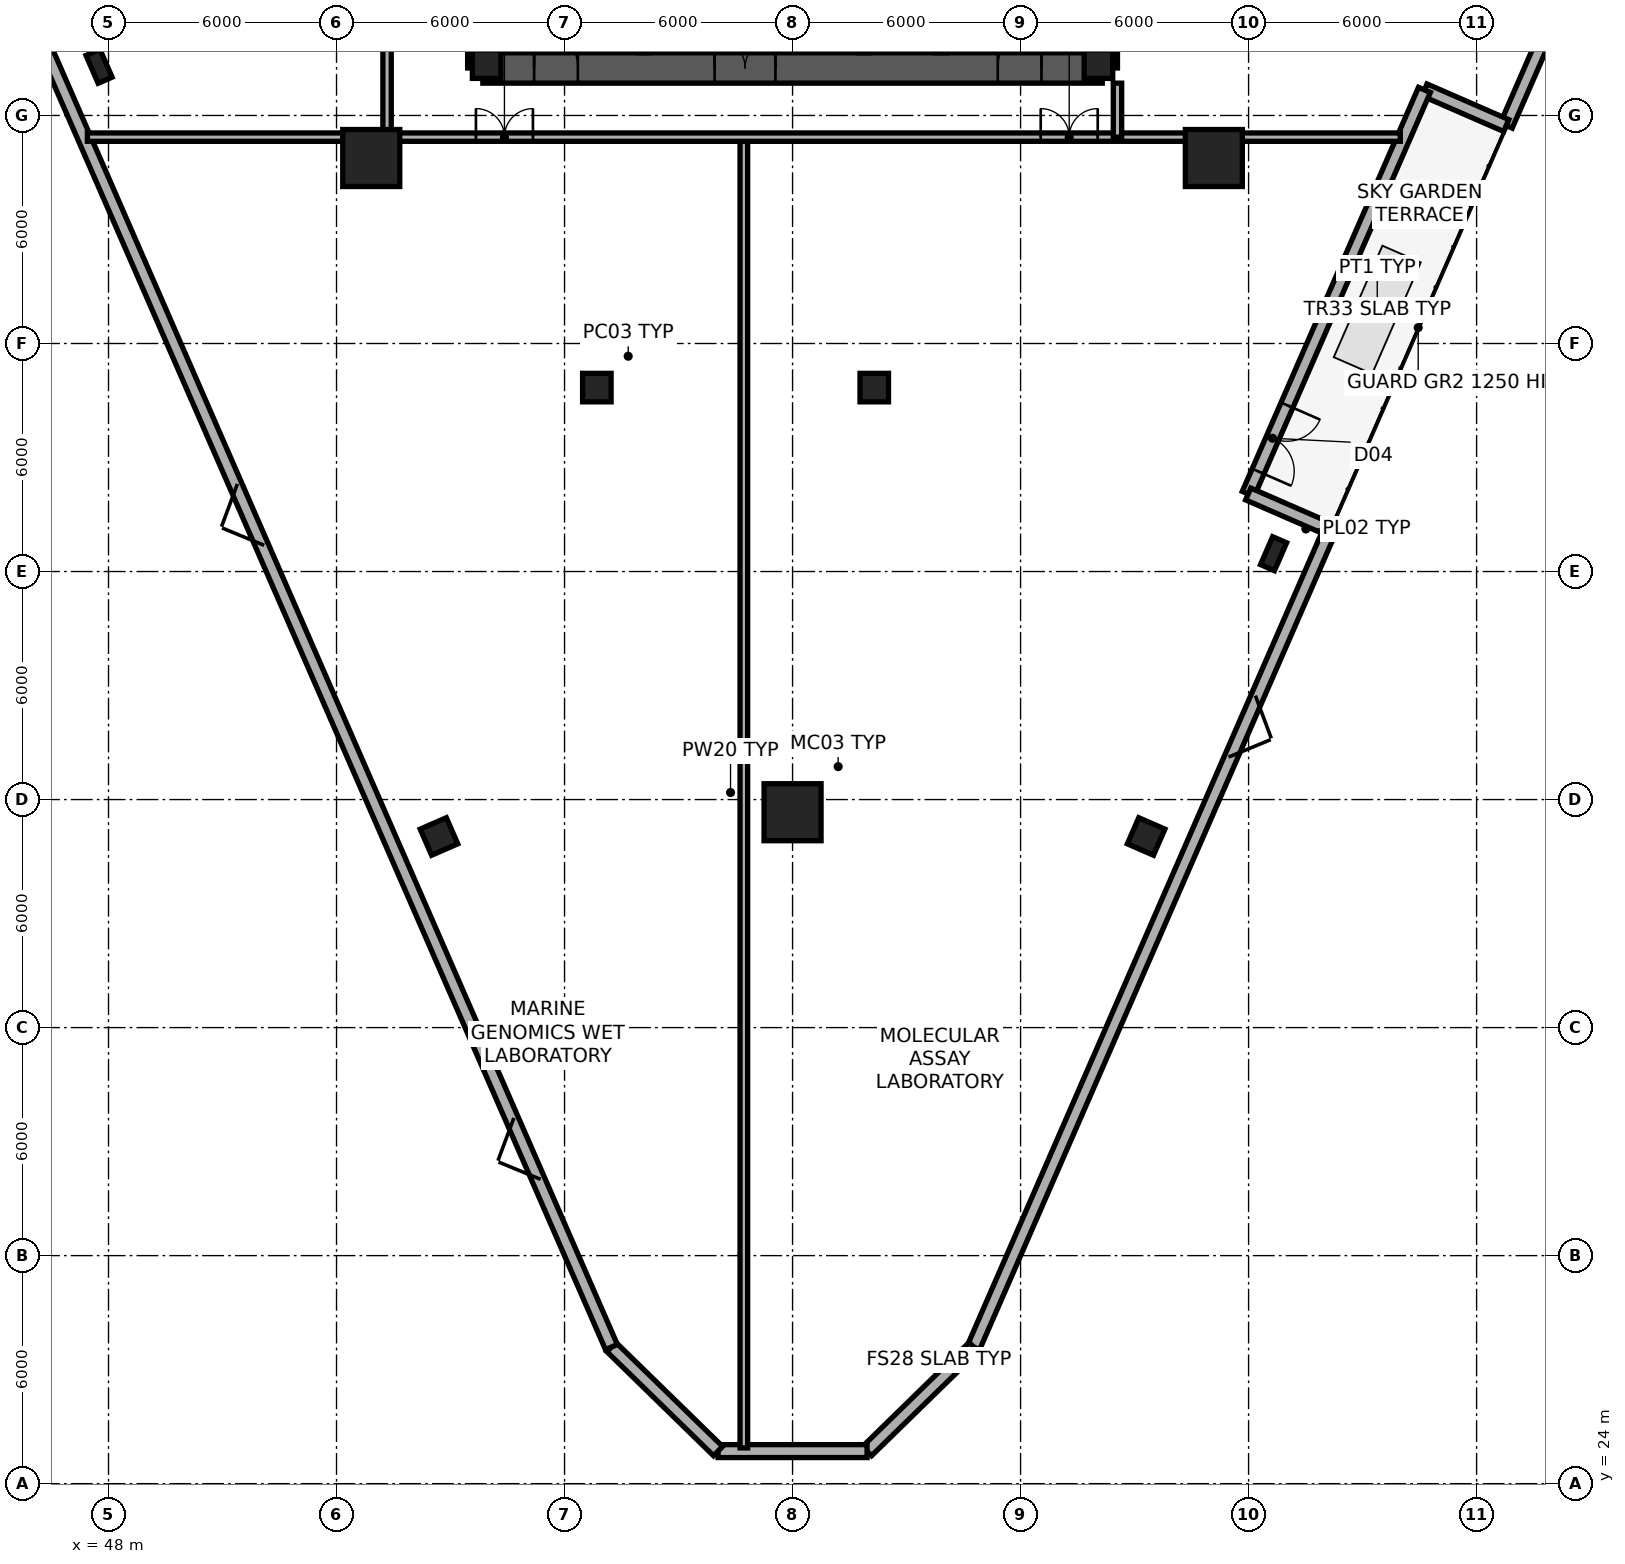
"""IFC4 building model, lengths in metres.
Left out: names, types, materials, properties, quantities, classifications, styles, units other than length and angle.
Written with IfcOpenShell. Run it as: python <this file> out.ifc"""

import sys

from ifc_helpers import new_model, si_unit, direction, frame, frame_2d, origin, origin_2d, place, context, subcontext, project, spatial, rectangle, extrude, element, fill, save


model = new_model("IFC4")
c1 = context("Model", 3, precision=1e-05, world=origin(), true_north=direction((0.0, 1.0)))
c2 = subcontext(c1, "Body", "Model", "MODEL_VIEW")
j1 = project(units=[si_unit("LENGTHUNIT", "METRE"), si_unit("PLANEANGLEUNIT", "RADIAN")], contexts=[c1])
p1 = place(None, origin())
s1 = spatial("IfcSite", under=j1, at=p1, CompositionType="ELEMENT")
p2 = place(p1, origin())
s2 = spatial("IfcBuilding", under=s1, at=p2, CompositionType="ELEMENT")
p3 = place(p2, frame((0.0, 0.0, 149.1)))
s3 = spatial("IfcBuildingStorey", under=s2, at=p3, CompositionType="ELEMENT", Elevation=149.1)
p4 = place(p3, frame((57.85, 61.25, 0.0), z_axis=(0.0, 0.0, 1.0), x_axis=(1.0, 0.0, 0.0)))
e1 = element("IfcWall", 1, at=p4, inside=s3, PredefinedType="SHEAR", context=c2, shape_type="SweptSolid", body=[
    extrude(rectangle(XDim=16.3, YDim=0.8, at=frame_2d((8.15, 0.0))), origin(), (0.0, 0.0, 1.0), 3.65),
])
p5 = place(p4, frame((1.35, 0.0, 0.0)))
e2 = element("IfcOpeningElement", 2, at=p5, cuts=e1, PredefinedType="OPENING", context=c2, shape_type="SweptSolid", body=[
    extrude(rectangle(XDim=1.15, YDim=2.15, at=frame_2d((0.575, 1.075))), frame((0.0, 0.41, 0.0), z_axis=(0.0, -1.0, 0.0), x_axis=(1.0, 0.0, 0.0)), (0.0, 0.0, 1.0), 0.82),
])
p6 = place(p4, frame((6.1, 0.0, 0.0)))
e3 = element("IfcOpeningElement", 3, at=p6, cuts=e1, PredefinedType="OPENING", context=c2, shape_type="SweptSolid", body=[
    extrude(rectangle(XDim=1.6, YDim=2.15, at=frame_2d((0.8, 1.075))), frame((0.0, 0.41, 0.0), z_axis=(0.0, -1.0, 0.0), x_axis=(1.0, 0.0, 0.0)), (0.0, 0.0, 1.0), 0.82),
])
p7 = place(p4, frame((13.55, 0.0, 0.0)))
e4 = element("IfcOpeningElement", 4, at=p7, cuts=e1, PredefinedType="OPENING", context=c2, shape_type="SweptSolid", body=[
    extrude(rectangle(XDim=1.15, YDim=2.15, at=frame_2d((0.575, 1.075))), frame((0.0, 0.41, 0.0), z_axis=(0.0, -1.0, 0.0), x_axis=(1.0, 0.0, 0.0)), (0.0, 0.0, 1.0), 0.82),
])
p8 = place(p3, frame((74.15, 61.25, 0.0), z_axis=(0.0, 0.0, 1.0), x_axis=(0.0, 1.0, 0.0)))
e5 = element("IfcWall", 5, at=p8, inside=s3, PredefinedType="SHEAR", context=c2, shape_type="SweptSolid", body=[
    extrude(rectangle(XDim=13.5, YDim=0.8, at=frame_2d((6.75, 0.0))), origin(), (0.0, 0.0, 1.0), 3.65),
])
p9 = place(p3, frame((57.85, 74.75, 0.0), z_axis=(0.0, 0.0, 1.0), x_axis=(0.0, -1.0, 0.0)))
e6 = element("IfcWall", 6, at=p9, inside=s3, PredefinedType="SHEAR", context=c2, shape_type="SweptSolid", body=[
    extrude(rectangle(XDim=13.5, YDim=0.8, at=frame_2d((6.75, 0.0))), origin(), (0.0, 0.0, 1.0), 3.65),
])
p10 = place(p9, frame((0.8, 0.0, 0.0)))
e7 = element("IfcOpeningElement", 7, at=p10, cuts=e6, PredefinedType="OPENING", context=c2, shape_type="SweptSolid", body=[
    extrude(rectangle(XDim=0.92, YDim=2.05, at=frame_2d((0.46, 1.025))), frame((0.0, 0.41, 0.0), z_axis=(0.0, -1.0, 0.0), x_axis=(1.0, 0.0, 0.0)), (0.0, 0.0, 1.0), 0.82),
])
p11 = place(p9, frame((2.5, 0.0, 0.0)))
e8 = element("IfcOpeningElement", 8, at=p11, cuts=e6, PredefinedType="OPENING", context=c2, shape_type="SweptSolid", body=[
    extrude(rectangle(XDim=1.6, YDim=2.3, at=frame_2d((0.8, 1.15))), frame((0.0, 0.41, 0.0), z_axis=(0.0, -1.0, 0.0), x_axis=(1.0, 0.0, 0.0)), (0.0, 0.0, 1.0), 0.82),
])
p12 = place(p3, frame((62.09, 61.65, 0.0), z_axis=(0.0, 0.0, 1.0), x_axis=(0.0, 1.0, 0.0)))
e9 = element("IfcWall", 9, at=p12, inside=s3, PredefinedType="SHEAR", context=c2, shape_type="SweptSolid", body=[
    extrude(rectangle(XDim=12.7, YDim=0.32, at=frame_2d((6.35, 0.0))), origin(), (0.0, 0.0, 1.0), 3.65),
])
p13 = place(p12, frame((0.55, 0.0, 0.0)))
e10 = element("IfcOpeningElement", 10, at=p13, cuts=e9, PredefinedType="OPENING", context=c2, shape_type="SweptSolid", body=[
    extrude(rectangle(XDim=1.15, YDim=2.15, at=frame_2d((0.575, 1.075))), frame((0.0, 0.17, 0.0), z_axis=(0.0, -1.0, 0.0), x_axis=(1.0, 0.0, 0.0)), (0.0, 0.0, 1.0), 0.34),
])
p14 = place(p3, frame((69.91, 61.65, 0.0), z_axis=(0.0, 0.0, 1.0), x_axis=(0.0, 1.0, 0.0)))
e11 = element("IfcWall", 11, at=p14, inside=s3, PredefinedType="SHEAR", context=c2, shape_type="SweptSolid", body=[
    extrude(rectangle(XDim=12.7, YDim=0.32, at=frame_2d((6.35, 0.0))), origin(), (0.0, 0.0, 1.0), 3.65),
])
p15 = place(p14, frame((8.75, 0.0, 0.0)))
e12 = element("IfcOpeningElement", 12, at=p15, cuts=e11, PredefinedType="OPENING", context=c2, shape_type="SweptSolid", body=[
    extrude(rectangle(XDim=0.92, YDim=2.05, at=frame_2d((0.46, 1.025))), frame((0.0, 0.17, 0.0), z_axis=(0.0, -1.0, 0.0), x_axis=(1.0, 0.0, 0.0)), (0.0, 0.0, 1.0), 0.34),
])
p16 = place(p3, frame((67.88, 61.65, 0.0), z_axis=(0.0, 0.0, 1.0), x_axis=(0.0, 1.0, 0.0)))
e13 = element("IfcWall", 13, at=p16, inside=s3, PredefinedType="SHEAR", context=c2, shape_type="SweptSolid", body=[
    extrude(rectangle(XDim=6.15, YDim=0.28, at=frame_2d((3.075, 0.0))), origin(), (0.0, 0.0, 1.0), 3.65),
])
p17 = place(p16, frame((1.1, 0.0, 0.0)))
e14 = element("IfcOpeningElement", 14, at=p17, cuts=e13, PredefinedType="OPENING", context=c2, shape_type="SweptSolid", body=[
    extrude(rectangle(XDim=0.92, YDim=2.05, at=frame_2d((0.46, 1.025))), frame((0.0, 0.15, 0.0), z_axis=(0.0, -1.0, 0.0), x_axis=(1.0, 0.0, 0.0)), (0.0, 0.0, 1.0), 0.3),
])
for number, where, z_axis, x_axis in (
    (15, (57.95, 61.35, 0.0), (0.0, 0.0, 1.0), (1.0, 0.0, 0.0)),
    (16, (74.05, 61.35, 0.0), (0.0, 0.0, 1.0), (1.0, 0.0, 0.0)),
    (17, (60.85, 52.84, 0.0), (0.0, 0.0, 1.0), (1.0, 0.0, 0.0)),
    (18, (68.15, 52.84, 0.0), (0.0, 0.0, 1.0), (1.0, 0.0, 0.0)),
):
    element("IfcColumn", number, at=place(p3, frame(where, z_axis=z_axis, x_axis=x_axis)), inside=s3, PredefinedType="COLUMN", context=c2, shape_type="SweptSolid", body=[
        extrude(rectangle(XDim=0.75, YDim=0.75, at=origin_2d()), origin(), (0.0, 0.0, 1.0), 3.65),
    ])
for number, where, z_axis, x_axis in (
    (19, (66.0, 41.667, 0.0), (0.0, 0.0, 1.0), (1.0, 0.0, 0.0)),
    (20, (77.086, 58.88, 0.0), (0.0, 0.0, 1.0), (1.0, 0.0, 0.0)),
    (21, (54.914, 58.88, 0.0), (0.0, 0.0, 1.0), (1.0, 0.0, 0.0)),
):
    element("IfcColumn", number, at=place(p3, frame(where, z_axis=z_axis, x_axis=x_axis)), inside=s3, PredefinedType="COLUMN", context=c2, shape_type="SweptSolid", body=[
        extrude(rectangle(XDim=1.5, YDim=1.5, at=origin_2d()), origin(), (0.0, 0.0, 1.0), 3.65),
    ])
p18 = place(p3, frame((75.327, 40.929, 0.003), z_axis=(-0.012375141264, 0.054450621561, 0.998439775695), x_axis=(-0.186922165753, -0.981040369671, 0.05118492967)))
e22 = element("IfcColumn", 22, at=p18, inside=s3, PredefinedType="COLUMN", context=c2, shape_type="SweptSolid", body=[
    extrude(rectangle(XDim=0.75, YDim=0.75, at=origin_2d()), origin(), (0.0, 0.0, 1.0), 3.65),
])
p19 = place(p3, frame((78.693, 48.4, 0.003), z_axis=(-0.019612004119, 0.038286915892, 0.999074312234), x_axis=(0.061780737122, -0.99731050874, 0.03943208944)))
e23 = element("IfcColumn", 23, at=p19, inside=s3, PredefinedType="PILASTER", context=c2, shape_type="SweptSolid", body=[
    extrude(rectangle(XDim=0.8, YDim=0.4, at=origin_2d()), origin(), (0.0, 0.0, 1.0), 3.647),
])
p20 = place(p3, frame((47.693, 61.275, 0.003), z_axis=(0.032006476949, 0.010512587617, 0.999432374368), x_axis=(0.745657597589, 0.665613347438, -0.030880720032)))
e24 = element("IfcColumn", 24, at=p20, inside=s3, PredefinedType="PILASTER", context=c2, shape_type="SweptSolid", body=[
    extrude(rectangle(XDim=0.8, YDim=0.4, at=origin_2d()), origin(), (0.0, 0.0, 1.0), 3.646),
])
p21 = place(p3, frame((56.673, 40.929, 0.003), z_axis=(0.012375141264, 0.054450621561, 0.998439775695), x_axis=(-0.186922165753, 0.981040369671, -0.05118492967)))
e25 = element("IfcColumn", 25, at=p21, inside=s3, PredefinedType="COLUMN", context=c2, shape_type="SweptSolid", body=[
    extrude(rectangle(XDim=0.75, YDim=0.75, at=origin_2d()), origin(), (0.0, 0.0, 1.0), 3.65),
])
p22 = place(p3, frame((94.159, 81.241, 0.0), z_axis=(0.0, 0.0, 1.0), x_axis=(-0.399698418424, -0.916646700921, 0.0)))
e26 = element("IfcWall", 26, at=p22, inside=s3, PredefinedType="STANDARD", context=c2, shape_type="SweptSolid", body=[
    extrude(rectangle(XDim=23.462, YDim=0.34, at=frame_2d((11.731, 0.0))), origin(), (0.0, 0.0, 1.0), 0.85),
])
p23 = place(p3, frame((84.781, 59.734, 0.0), z_axis=(0.0, 0.0, 1.0), x_axis=(-0.916654976367, 0.399679439429, 0.0)))
e27 = element("IfcWall", 27, at=p23, inside=s3, PredefinedType="STANDARD", context=c2, shape_type="SweptSolid", body=[
    extrude(rectangle(XDim=2.35, YDim=0.34, at=frame_2d((1.175, 0.0))), origin(), (0.0, 0.0, 1.0), 2.575),
])
p24 = place(p3, frame((82.627, 60.673, 0.0), z_axis=(0.0, 0.0, 1.0), x_axis=(-0.399697883631, -0.916646934114, 0.0)))
e28 = element("IfcWall", 28, at=p24, inside=s3, PredefinedType="STANDARD", context=c2, shape_type="SweptSolid", body=[
    extrude(rectangle(XDim=11.6, YDim=0.34, at=frame_2d((5.8, 0.0))), origin(), (0.0, 0.0, 1.0), 2.905),
])
p25 = place(p24, frame((9.05, 0.0, 0.0)))
e29 = element("IfcOpeningElement", 29, at=p25, cuts=e28, PredefinedType="OPENING", context=c2, shape_type="SweptSolid", body=[
    extrude(rectangle(XDim=1.9, YDim=2.3, at=frame_2d((0.95, 1.15))), frame((0.0, 0.18, 0.0), z_axis=(0.0, -1.0, 0.0), x_axis=(1.0, 0.0, 0.0)), (0.0, 0.0, 1.0), 0.36),
])
p26 = place(p3, frame((77.99, 50.04, 0.0), z_axis=(0.0, 0.0, 1.0), x_axis=(0.916654976367, -0.399679439429, 0.0)))
e30 = element("IfcWall", 30, at=p26, inside=s3, PredefinedType="STANDARD", context=c2, shape_type="SweptSolid", body=[
    extrude(rectangle(XDim=2.35, YDim=0.34, at=frame_2d((1.175, 0.0))), origin(), (0.0, 0.0, 1.0), 2.575),
])
p27 = place(p3, frame((80.145, 49.101, 0.0), z_axis=(0.0, 0.0, 1.0), x_axis=(-0.399698418424, -0.916646700921, 0.0)))
e31 = element("IfcWall", 31, at=p27, inside=s3, PredefinedType="STANDARD", context=c2, shape_type="SweptSolid", body=[
    extrude(rectangle(XDim=23.462, YDim=0.34, at=frame_2d((11.731, 0.0))), origin(), (0.0, 0.0, 1.0), 0.85),
])
p28 = place(p3, frame((70.767, 27.594, 0.0), z_axis=(0.0, 0.0, 1.0), x_axis=(-0.715770561267, -0.698335523672, 0.0)))
e32 = element("IfcWall", 32, at=p28, inside=s3, PredefinedType="STANDARD", context=c2, shape_type="SweptSolid", body=[
    extrude(rectangle(XDim=3.921, YDim=0.34, at=frame_2d((1.96, 0.0))), origin(), (0.0, 0.0, 1.0), 3.375),
])
p29 = place(p3, frame((67.96, 24.856, 0.0), z_axis=(0.0, 0.0, 1.0), x_axis=(-1.0, 0.0, 0.0)))
e33 = element("IfcWall", 33, at=p29, inside=s3, PredefinedType="STANDARD", context=c2, shape_type="SweptSolid", body=[
    extrude(rectangle(XDim=3.92, YDim=0.34, at=frame_2d((1.96, 0.0))), origin(), (0.0, 0.0, 1.0), 3.375),
])
p30 = place(p3, frame((64.04, 24.856, 0.0), z_axis=(0.0, 0.0, 1.0), x_axis=(-0.715770561267, 0.698335523672, 0.0)))
e34 = element("IfcWall", 34, at=p30, inside=s3, PredefinedType="STANDARD", context=c2, shape_type="SweptSolid", body=[
    extrude(rectangle(XDim=3.921, YDim=0.34, at=frame_2d((1.96, 0.0))), origin(), (0.0, 0.0, 1.0), 3.375),
])
p31 = place(p3, frame((61.233, 27.594, 0.0), z_axis=(0.0, 0.0, 1.0), x_axis=(-0.399698312425, 0.916646747141, 0.0)))
e35 = element("IfcWall", 35, at=p31, inside=s3, PredefinedType="STANDARD", context=c2, shape_type="SweptSolid", body=[
    extrude(rectangle(XDim=58.525, YDim=0.34, at=frame_2d((29.262, 0.0))), origin(), (0.0, 0.0, 1.0), 0.85),
])
p32 = place(p3, frame((64.718, 24.941, 0.0), z_axis=(0.0, 0.0, 1.0), x_axis=(0.0, 1.0, 0.0)))
e36 = element("IfcWall", 36, at=p32, inside=s3, PredefinedType="PARTITIONING", context=c2, shape_type="SweptSolid", body=[
    extrude(rectangle(XDim=34.489, YDim=0.2, at=frame_2d((17.244, 0.0))), origin(), (0.0, 0.0, 1.0), 2.575),
])
p33 = place(p3, frame((47.444, 59.43, 0.0), z_axis=(0.0, 0.0, 1.0), x_axis=(1.0, 0.0, 0.0)))
e37 = element("IfcWall", 37, at=p33, inside=s3, PredefinedType="PARTITIONING", context=c2, shape_type="SweptSolid", body=[
    extrude(rectangle(XDim=34.548, YDim=0.22, at=frame_2d((17.274, 0.0))), origin(), (0.0, 0.0, 1.0), 2.575),
])
p34 = place(p33, frame((10.224, 0.0, 0.0)))
e38 = element("IfcOpeningElement", 38, at=p34, cuts=e37, PredefinedType="OPENING", context=c2, shape_type="SweptSolid", body=[
    extrude(rectangle(XDim=1.5, YDim=2.2, at=frame_2d((0.75, 1.1))), frame((0.0, 0.12, 0.0), z_axis=(0.0, -1.0, 0.0), x_axis=(1.0, 0.0, 0.0)), (0.0, 0.0, 1.0), 0.24),
])
p35 = place(p33, frame((25.086, 0.0, 0.0)))
e39 = element("IfcOpeningElement", 39, at=p35, cuts=e37, PredefinedType="OPENING", context=c2, shape_type="SweptSolid", body=[
    extrude(rectangle(XDim=1.5, YDim=2.2, at=frame_2d((0.75, 1.1))), frame((0.0, 0.12, 0.0), z_axis=(0.0, -1.0, 0.0), x_axis=(1.0, 0.0, 0.0)), (0.0, 0.0, 1.0), 0.24),
])
p36 = place(p3, frame((55.33, 59.43, 0.0), z_axis=(0.0, 0.0, 1.0), x_axis=(0.0, 1.0, 0.0)))
e40 = element("IfcWall", 40, at=p36, inside=s3, PredefinedType="PARTITIONING", context=c2, shape_type="SweptSolid", body=[
    extrude(rectangle(XDim=17.8, YDim=0.22, at=frame_2d((8.9, 0.0))), origin(), (0.0, 0.0, 1.0), 2.705),
])
p37 = place(p36, frame((3.95, 0.0, 0.0)))
e41 = element("IfcOpeningElement", 41, at=p37, cuts=e40, PredefinedType="OPENING", context=c2, shape_type="SweptSolid", body=[
    extrude(rectangle(XDim=1.0, YDim=2.1, at=frame_2d((0.5, 1.05))), frame((0.0, 0.12, 0.0), z_axis=(0.0, -1.0, 0.0), x_axis=(1.0, 0.0, 0.0)), (0.0, 0.0, 1.0), 0.24),
])
p38 = place(p36, frame((12.85, 0.0, 0.0)))
e42 = element("IfcOpeningElement", 42, at=p38, cuts=e40, PredefinedType="OPENING", context=c2, shape_type="SweptSolid", body=[
    extrude(rectangle(XDim=1.0, YDim=2.1, at=frame_2d((0.5, 1.05))), frame((0.0, 0.12, 0.0), z_axis=(0.0, -1.0, 0.0), x_axis=(1.0, 0.0, 0.0)), (0.0, 0.0, 1.0), 0.24),
])
p39 = place(p3, frame((74.55, 59.43, 0.0), z_axis=(0.0, 0.0, 1.0), x_axis=(0.0, 1.0, 0.0)))
e43 = element("IfcWall", 43, at=p39, inside=s3, PredefinedType="PARTITIONING", context=c2, shape_type="SweptSolid", body=[
    extrude(rectangle(XDim=1.42, YDim=0.22, at=frame_2d((0.71, 0.0))), origin(), (0.0, 0.0, 1.0), 2.705),
])
p40 = place(p25, origin())
e44 = element("IfcDoor", 44, at=p40, inside=s3, OperationType="DOUBLE_DOOR_SINGLE_SWING", PredefinedType="DOOR", context=c2, shape_type="SweptSolid", body=[
    extrude(rectangle(XDim=1.9, YDim=2.3, at=frame_2d((0.95, 1.15))), frame((0.0, 0.025, 0.0), z_axis=(0.0, -1.0, 0.0), x_axis=(1.0, 0.0, 0.0)), (0.0, 0.0, 1.0), 0.05),
])
fill(e29, e44)
p41 = place(p5, origin())
e45 = element("IfcDoor", 45, at=p41, inside=s3, OperationType="SINGLE_SWING_LEFT", PredefinedType="DOOR", context=c2, shape_type="SweptSolid", body=[
    extrude(rectangle(XDim=1.15, YDim=2.15, at=frame_2d((0.575, 1.075))), frame((0.0, 0.025, 0.0), z_axis=(0.0, -1.0, 0.0), x_axis=(1.0, 0.0, 0.0)), (0.0, 0.0, 1.0), 0.05),
])
fill(e2, e45)
p42 = place(p6, origin())
e46 = element("IfcDoor", 46, at=p42, inside=s3, OperationType="DOUBLE_DOOR_SINGLE_SWING", PredefinedType="DOOR", context=c2, shape_type="SweptSolid", body=[
    extrude(rectangle(XDim=1.6, YDim=2.15, at=frame_2d((0.8, 1.075))), frame((0.0, 0.025, 0.0), z_axis=(0.0, -1.0, 0.0), x_axis=(1.0, 0.0, 0.0)), (0.0, 0.0, 1.0), 0.05),
])
fill(e3, e46)
p43 = place(p7, origin())
e47 = element("IfcDoor", 47, at=p43, inside=s3, OperationType="SINGLE_SWING_RIGHT", PredefinedType="DOOR", context=c2, shape_type="SweptSolid", body=[
    extrude(rectangle(XDim=1.15, YDim=2.15, at=frame_2d((0.575, 1.075))), frame((0.0, 0.025, 0.0), z_axis=(0.0, -1.0, 0.0), x_axis=(1.0, 0.0, 0.0)), (0.0, 0.0, 1.0), 0.05),
])
fill(e4, e47)
p44 = place(p34, origin())
e48 = element("IfcDoor", 48, at=p44, inside=s3, OperationType="DOUBLE_DOOR_SINGLE_SWING", PredefinedType="DOOR", context=c2, shape_type="SweptSolid", body=[
    extrude(rectangle(XDim=1.5, YDim=2.2, at=frame_2d((0.75, 1.1))), frame((0.0, 0.025, 0.0), z_axis=(0.0, -1.0, 0.0), x_axis=(1.0, 0.0, 0.0)), (0.0, 0.0, 1.0), 0.05),
])
fill(e38, e48)
p45 = place(p35, origin())
e49 = element("IfcDoor", 49, at=p45, inside=s3, OperationType="DOUBLE_DOOR_SINGLE_SWING", PredefinedType="DOOR", context=c2, shape_type="SweptSolid", body=[
    extrude(rectangle(XDim=1.5, YDim=2.2, at=frame_2d((0.75, 1.1))), frame((0.0, 0.025, 0.0), z_axis=(0.0, -1.0, 0.0), x_axis=(1.0, 0.0, 0.0)), (0.0, 0.0, 1.0), 0.05),
])
fill(e39, e49)
save(model, sys.argv[1])
